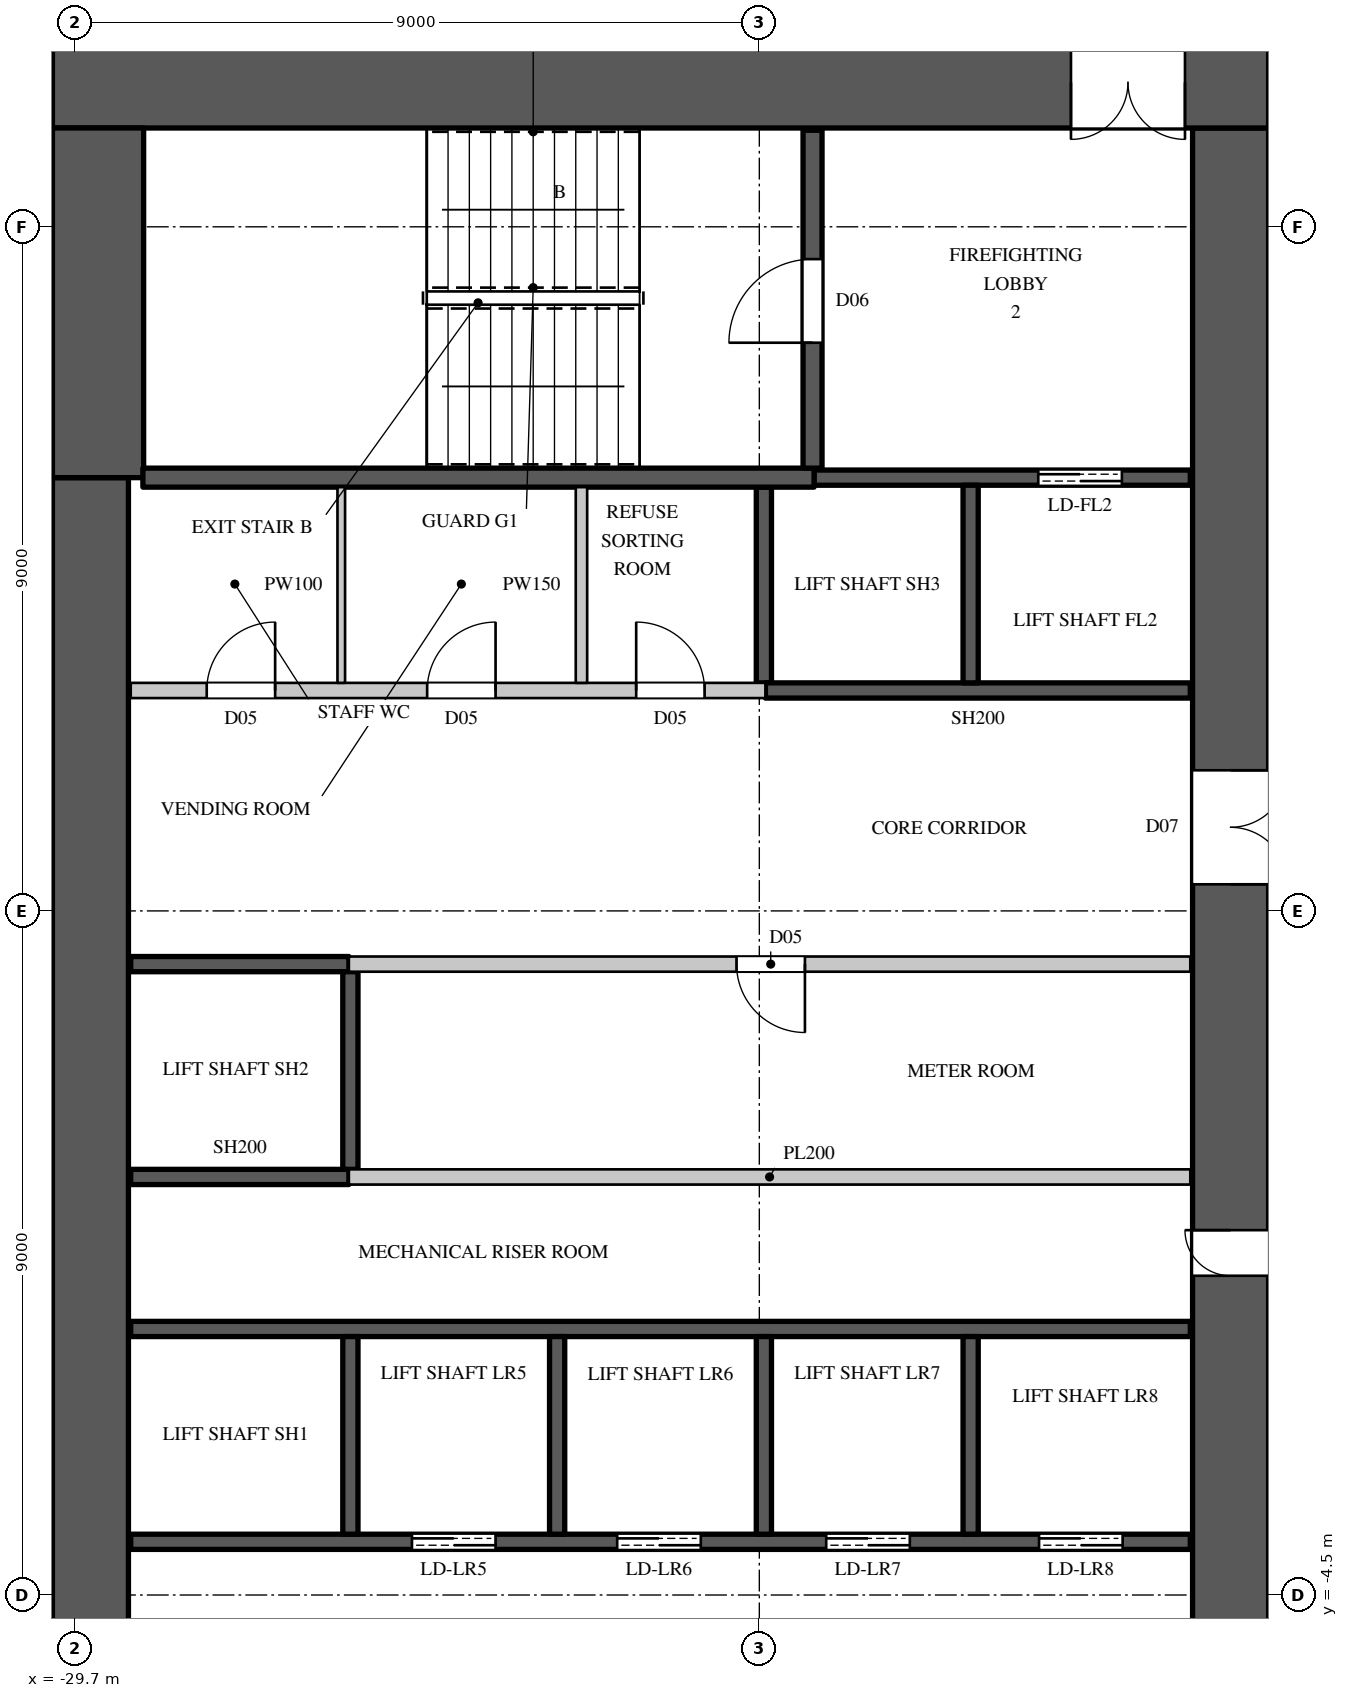
"""IFC4 building model, lengths in metres.
Left out: names, types, materials, properties, quantities, classifications, styles, units other than length and angle.
Written with IfcOpenShell. Run it as: python <this file> out.ifc"""

import sys

from ifc_helpers import new_model, si_unit, direction, frame, frame_2d, origin, place, context, subcontext, project, spatial, rectangle, extrude, element, fill, save


model = new_model("IFC4")
c1 = context("Model", 3, precision=1e-05, world=origin(), true_north=direction((0.0, 1.0)))
c2 = subcontext(c1, "Body", "Model", "MODEL_VIEW")
j1 = project(units=[si_unit("LENGTHUNIT", "METRE"), si_unit("PLANEANGLEUNIT", "RADIAN")], contexts=[c1])
p1 = place(None, origin())
s1 = spatial("IfcSite", under=j1, at=p1, CompositionType="ELEMENT")
p2 = place(p1, origin())
s2 = spatial("IfcBuilding", under=s1, at=p2, CompositionType="ELEMENT")
p3 = place(p2, frame((0.0, 0.0, 66.3)))
s3 = spatial("IfcBuildingStorey", under=s2, at=p3, CompositionType="ELEMENT", Elevation=66.3)
p4 = place(p3, frame((-30.0, 15.4, 0.0), z_axis=(0.0, 0.0, 1.0), x_axis=(1.0, 0.0, 0.0)))
e1 = element("IfcWall", 1, at=p4, inside=s3, PredefinedType="SHEAR", context=c2, shape_type="SweptSolid", body=[
    extrude(rectangle(XDim=16.0, YDim=1.2, at=frame_2d((8.0, 0.0))), origin(), (0.0, 0.0, 1.0), 3.6),
])
p5 = place(p4, frame((13.4, 0.0, 0.0)))
e2 = element("IfcOpeningElement", 2, at=p5, cuts=e1, PredefinedType="OPENING", context=c2, shape_type="SweptSolid", body=[
    extrude(rectangle(XDim=1.5, YDim=2.4, at=frame_2d((0.75, 1.2))), frame((0.0, 0.61, 0.0), z_axis=(0.0, -1.0, 0.0), x_axis=(1.0, 0.0, 0.0)), (0.0, 0.0, 1.0), 1.22),
])
p6 = place(p3, frame((-14.5, -14.8, 0.0), z_axis=(0.0, 0.0, 1.0), x_axis=(0.0, 1.0, 0.0)))
e3 = element("IfcWall", 3, at=p6, inside=s3, PredefinedType="SHEAR", context=c2, shape_type="SweptSolid", body=[
    extrude(rectangle(XDim=29.6, YDim=1.0, at=frame_2d((14.8, 0.0))), origin(), (0.0, 0.0, 1.0), 3.6),
])
p7 = place(p6, frame((8.45, 0.0, 0.0)))
e4 = element("IfcOpeningElement", 4, at=p7, cuts=e3, PredefinedType="OPENING", context=c2, shape_type="SweptSolid", body=[
    extrude(rectangle(XDim=1.5, YDim=2.4, at=frame_2d((0.75, 1.2))), frame((0.0, 0.51, 0.0), z_axis=(0.0, -1.0, 0.0), x_axis=(1.0, 0.0, 0.0)), (0.0, 0.0, 1.0), 1.02),
])
p8 = place(p6, frame((19.65, 0.0, 0.0)))
e5 = element("IfcOpeningElement", 5, at=p8, cuts=e3, PredefinedType="OPENING", context=c2, shape_type="SweptSolid", body=[
    extrude(rectangle(XDim=1.5, YDim=2.4, at=frame_2d((0.75, 1.2))), frame((0.0, 0.51, 0.0), z_axis=(0.0, -1.0, 0.0), x_axis=(1.0, 0.0, 0.0)), (0.0, 0.0, 1.0), 1.02),
])
p9 = place(p6, frame((14.5, 0.0, 0.0)))
e6 = element("IfcOpeningElement", 6, at=p9, cuts=e3, PredefinedType="OPENING", context=c2, shape_type="SweptSolid", body=[
    extrude(rectangle(XDim=0.6, YDim=2.0, at=frame_2d((0.3, 1.0))), frame((0.0, 0.51, 0.0), z_axis=(0.0, -1.0, 0.0), x_axis=(1.0, 0.0, 0.0)), (0.0, 0.0, 1.0), 1.02),
])
p10 = place(p3, frame((-29.5, -10.2, 0.0), z_axis=(0.0, 0.0, 1.0), x_axis=(0.0, 1.0, 0.0)))
e7 = element("IfcWall", 7, at=p10, inside=s3, PredefinedType="SHEAR", context=c2, shape_type="SweptSolid", body=[
    extrude(rectangle(XDim=20.4, YDim=1.0, at=frame_2d((10.2, 0.0))), origin(), (0.0, 0.0, 1.0), 3.6),
])
p11 = place(p3, frame((-29.4, 10.2, 0.0), z_axis=(0.0, 0.0, 1.0), x_axis=(0.0, 1.0, 0.0)))
e8 = element("IfcWall", 8, at=p11, inside=s3, PredefinedType="SHEAR", context=c2, shape_type="SweptSolid", body=[
    extrude(rectangle(XDim=4.6, YDim=1.2, at=frame_2d((2.3, 0.0))), origin(), (0.0, 0.0, 1.0), 3.6),
])
p12 = place(p3, frame((-28.97, 7.4, 0.0), z_axis=(0.0, 0.0, 1.0), x_axis=(1.0, 0.0, 0.0)))
e9 = element("IfcWall", 9, at=p12, inside=s3, PredefinedType="PARTITIONING", context=c2, shape_type="SweptSolid", body=[
    extrude(rectangle(XDim=8.35, YDim=0.2, at=frame_2d((4.175, 0.0))), origin(), (0.0, 0.0, 1.0), 3.3),
])
p13 = place(p12, frame((1.0, 0.0, 0.0)))
e10 = element("IfcOpeningElement", 10, at=p13, cuts=e9, PredefinedType="OPENING", context=c2, shape_type="SweptSolid", body=[
    extrude(rectangle(XDim=0.9, YDim=2.2, at=frame_2d((0.45, 1.1))), frame((0.0, 0.11, 0.0), z_axis=(0.0, -1.0, 0.0), x_axis=(1.0, 0.0, 0.0)), (0.0, 0.0, 1.0), 0.22),
])
p14 = place(p12, frame((3.9, 0.0, 0.0)))
e11 = element("IfcOpeningElement", 11, at=p14, cuts=e9, PredefinedType="OPENING", context=c2, shape_type="SweptSolid", body=[
    extrude(rectangle(XDim=0.9, YDim=2.2, at=frame_2d((0.45, 1.1))), frame((0.0, 0.11, 0.0), z_axis=(0.0, -1.0, 0.0), x_axis=(1.0, 0.0, 0.0)), (0.0, 0.0, 1.0), 0.22),
])
p15 = place(p12, frame((6.65, 0.0, 0.0)))
e12 = element("IfcOpeningElement", 12, at=p15, cuts=e9, PredefinedType="OPENING", context=c2, shape_type="SweptSolid", body=[
    extrude(rectangle(XDim=0.9, YDim=2.2, at=frame_2d((0.45, 1.1))), frame((0.0, 0.11, 0.0), z_axis=(0.0, -1.0, 0.0), x_axis=(1.0, 0.0, 0.0)), (0.0, 0.0, 1.0), 0.22),
])
p16 = place(p3, frame((-23.04, 7.5, 0.0), z_axis=(0.0, 0.0, 1.0), x_axis=(0.0, 1.0, 0.0)))
e13 = element("IfcWall", 13, at=p16, inside=s3, PredefinedType="PARTITIONING", context=c2, shape_type="SweptSolid", body=[
    extrude(rectangle(XDim=2.575, YDim=0.15, at=frame_2d((1.288, 0.0))), origin(), (0.0, 0.0, 1.0), 3.3),
])
p17 = place(p3, frame((-26.1, 1.0, 0.0), z_axis=(0.0, 0.0, 1.0), x_axis=(1.0, 0.0, 0.0)))
e14 = element("IfcWall", 14, at=p17, inside=s3, PredefinedType="PARTITIONING", context=c2, shape_type="SweptSolid", body=[
    extrude(rectangle(XDim=11.07, YDim=0.2, at=frame_2d((5.535, 0.0))), origin(), (0.0, 0.0, 1.0), 3.3),
])
p18 = place(p3, frame((-26.1, 3.8, 0.0), z_axis=(0.0, 0.0, 1.0), x_axis=(1.0, 0.0, 0.0)))
e15 = element("IfcWall", 15, at=p18, inside=s3, PredefinedType="PARTITIONING", context=c2, shape_type="SweptSolid", body=[
    extrude(rectangle(XDim=11.07, YDim=0.2, at=frame_2d((5.535, 0.0))), origin(), (0.0, 0.0, 1.0), 3.3),
])
p19 = place(p18, frame((5.1, 0.0, 0.0)))
e16 = element("IfcOpeningElement", 16, at=p19, cuts=e15, PredefinedType="OPENING", context=c2, shape_type="SweptSolid", body=[
    extrude(rectangle(XDim=0.9, YDim=2.2, at=frame_2d((0.45, 1.1))), frame((0.0, 0.11, 0.0), z_axis=(0.0, -1.0, 0.0), x_axis=(1.0, 0.0, 0.0)), (0.0, 0.0, 1.0), 0.22),
])
p20 = place(p3, frame((-28.97, -3.8, 0.0), z_axis=(0.0, 0.0, 1.0), x_axis=(1.0, 0.0, 0.0)))
e17 = element("IfcWall", 17, at=p20, inside=s3, PredefinedType="SHEAR", context=c2, shape_type="SweptSolid", body=[
    extrude(rectangle(XDim=13.94, YDim=0.2, at=frame_2d((6.97, 0.0))), origin(), (0.0, 0.0, 1.0), 3.3),
])
p21 = place(p20, frame((3.7, 0.0, 0.0)))
e18 = element("IfcOpeningElement", 18, at=p21, cuts=e17, PredefinedType="OPENING", context=c2, shape_type="SweptSolid", body=[
    extrude(rectangle(XDim=1.1, YDim=2.2, at=frame_2d((0.55, 1.1))), frame((0.0, 0.11, 0.0), z_axis=(0.0, -1.0, 0.0), x_axis=(1.0, 0.0, 0.0)), (0.0, 0.0, 1.0), 0.22),
])
p22 = place(p20, frame((6.4, 0.0, 0.0)))
e19 = element("IfcOpeningElement", 19, at=p22, cuts=e17, PredefinedType="OPENING", context=c2, shape_type="SweptSolid", body=[
    extrude(rectangle(XDim=1.1, YDim=2.2, at=frame_2d((0.55, 1.1))), frame((0.0, 0.11, 0.0), z_axis=(0.0, -1.0, 0.0), x_axis=(1.0, 0.0, 0.0)), (0.0, 0.0, 1.0), 0.22),
])
p23 = place(p20, frame((9.15, 0.0, 0.0)))
e20 = element("IfcOpeningElement", 20, at=p23, cuts=e17, PredefinedType="OPENING", context=c2, shape_type="SweptSolid", body=[
    extrude(rectangle(XDim=1.1, YDim=2.2, at=frame_2d((0.55, 1.1))), frame((0.0, 0.11, 0.0), z_axis=(0.0, -1.0, 0.0), x_axis=(1.0, 0.0, 0.0)), (0.0, 0.0, 1.0), 0.22),
])
p24 = place(p20, frame((11.95, 0.0, 0.0)))
e21 = element("IfcOpeningElement", 21, at=p24, cuts=e17, PredefinedType="OPENING", context=c2, shape_type="SweptSolid", body=[
    extrude(rectangle(XDim=1.1, YDim=2.2, at=frame_2d((0.55, 1.1))), frame((0.0, 0.11, 0.0), z_axis=(0.0, -1.0, 0.0), x_axis=(1.0, 0.0, 0.0)), (0.0, 0.0, 1.0), 0.22),
])
p25 = place(p3, frame((-28.97, -1.0, 0.0), z_axis=(0.0, 0.0, 1.0), x_axis=(1.0, 0.0, 0.0)))
e22 = element("IfcWall", 22, at=p25, inside=s3, PredefinedType="SHEAR", context=c2, shape_type="SweptSolid", body=[
    extrude(rectangle(XDim=13.94, YDim=0.2, at=frame_2d((6.97, 0.0))), origin(), (0.0, 0.0, 1.0), 3.3),
])
for number, where, z_axis, x_axis in (
    (23, (-28.97, 1.0, 0.0), (0.0, 0.0, 1.0), (1.0, 0.0, 0.0)),
    (24, (-28.97, 3.8, 0.0), (0.0, 0.0, 1.0), (1.0, 0.0, 0.0)),
):
    element("IfcWall", number, at=place(p3, frame(where, z_axis=z_axis, x_axis=x_axis)), inside=s3, PredefinedType="SHEAR", context=c2, shape_type="SweptSolid", body=[
        extrude(rectangle(XDim=2.87, YDim=0.2, at=frame_2d((1.435, 0.0))), origin(), (0.0, 0.0, 1.0), 3.3),
    ])
p26 = place(p3, frame((-26.08, -3.7, 0.0), z_axis=(0.0, 0.0, 1.0), x_axis=(0.0, 1.0, 0.0)))
e25 = element("IfcWall", 25, at=p26, inside=s3, PredefinedType="SHEAR", context=c2, shape_type="SweptSolid", body=[
    extrude(rectangle(XDim=2.6, YDim=0.2, at=frame_2d((1.3, 0.0))), origin(), (0.0, 0.0, 1.0), 3.6),
])
p27 = place(p3, frame((-26.08, 1.1, 0.0), z_axis=(0.0, 0.0, 1.0), x_axis=(0.0, 1.0, 0.0)))
e26 = element("IfcWall", 26, at=p27, inside=s3, PredefinedType="SHEAR", context=c2, shape_type="SweptSolid", body=[
    extrude(rectangle(XDim=2.6, YDim=0.2, at=frame_2d((1.3, 0.0))), origin(), (0.0, 0.0, 1.0), 3.3),
])
for number, where, z_axis, x_axis in (
    (27, (-23.36, -3.7, 0.0), (0.0, 0.0, 1.0), (0.0, 1.0, 0.0)),
    (28, (-20.64, -3.7, 0.0), (0.0, 0.0, 1.0), (0.0, 1.0, 0.0)),
):
    element("IfcWall", number, at=place(p3, frame(where, z_axis=z_axis, x_axis=x_axis)), inside=s3, PredefinedType="SHEAR", context=c2, shape_type="SweptSolid", body=[
        extrude(rectangle(XDim=2.6, YDim=0.2, at=frame_2d((1.3, 0.0))), origin(), (0.0, 0.0, 1.0), 3.6),
    ])
p28 = place(p3, frame((-20.64, 7.5, 0.0), z_axis=(0.0, 0.0, 1.0), x_axis=(0.0, 1.0, 0.0)))
e29 = element("IfcWall", 29, at=p28, inside=s3, PredefinedType="SHEAR", context=c2, shape_type="SweptSolid", body=[
    extrude(rectangle(XDim=2.575, YDim=0.2, at=frame_2d((1.288, 0.0))), origin(), (0.0, 0.0, 1.0), 3.3),
])
p29 = place(p3, frame((-20.62, 7.4, 0.0), z_axis=(0.0, 0.0, 1.0), x_axis=(1.0, 0.0, 0.0)))
e30 = element("IfcWall", 30, at=p29, inside=s3, PredefinedType="SHEAR", context=c2, shape_type="SweptSolid", body=[
    extrude(rectangle(XDim=5.59, YDim=0.2, at=frame_2d((2.795, 0.0))), origin(), (0.0, 0.0, 1.0), 3.3),
])
p30 = place(p3, frame((-19.98, 10.2, 0.0), z_axis=(0.0, 0.0, 1.0), x_axis=(1.0, 0.0, 0.0)))
e31 = element("IfcWall", 31, at=p30, inside=s3, PredefinedType="SHEAR", context=c2, shape_type="SweptSolid", body=[
    extrude(rectangle(XDim=4.95, YDim=0.2, at=frame_2d((2.475, 0.0))), origin(), (0.0, 0.0, 1.0), 3.3),
])
p31 = place(p30, frame((2.95, 0.0, 0.0)))
e32 = element("IfcOpeningElement", 32, at=p31, cuts=e31, PredefinedType="OPENING", context=c2, shape_type="SweptSolid", body=[
    extrude(rectangle(XDim=1.1, YDim=2.2, at=frame_2d((0.55, 1.1))), frame((0.0, 0.11, 0.0), z_axis=(0.0, -1.0, 0.0), x_axis=(1.0, 0.0, 0.0)), (0.0, 0.0, 1.0), 0.22),
])
p32 = place(p3, frame((-17.92, -3.7, 0.0), z_axis=(0.0, 0.0, 1.0), x_axis=(0.0, 1.0, 0.0)))
e33 = element("IfcWall", 33, at=p32, inside=s3, PredefinedType="SHEAR", context=c2, shape_type="SweptSolid", body=[
    extrude(rectangle(XDim=2.6, YDim=0.2, at=frame_2d((1.3, 0.0))), origin(), (0.0, 0.0, 1.0), 3.6),
])
p33 = place(p3, frame((-17.92, 7.5, 0.0), z_axis=(0.0, 0.0, 1.0), x_axis=(0.0, 1.0, 0.0)))
e34 = element("IfcWall", 34, at=p33, inside=s3, PredefinedType="SHEAR", context=c2, shape_type="SweptSolid", body=[
    extrude(rectangle(XDim=2.6, YDim=0.2, at=frame_2d((1.3, 0.0))), origin(), (0.0, 0.0, 1.0), 3.6),
])
p34 = place(p3, frame((-28.81, 10.2, 0.0), z_axis=(0.0, 0.0, 1.0), x_axis=(1.0, 0.0, 0.0)))
e35 = element("IfcWall", 35, at=p34, inside=s3, PredefinedType="SHEAR", context=c2, shape_type="SweptSolid", body=[
    extrude(rectangle(XDim=8.83, YDim=0.25, at=frame_2d((4.415, 0.0))), origin(), (0.0, 0.0, 1.0), 3.3),
])
p35 = place(p3, frame((-20.0, 10.325, 0.0), z_axis=(0.0, 0.0, 1.0), x_axis=(0.0, 1.0, 0.0)))
e36 = element("IfcWall", 36, at=p35, inside=s3, PredefinedType="SHEAR", context=c2, shape_type="SweptSolid", body=[
    extrude(rectangle(XDim=4.445, YDim=0.25, at=frame_2d((2.223, 0.0))), origin(), (0.0, 0.0, 1.0), 3.3),
])
p36 = place(p35, frame((1.65, 0.0, 0.0)))
e37 = element("IfcOpeningElement", 37, at=p36, cuts=e36, PredefinedType="OPENING", context=c2, shape_type="SweptSolid", body=[
    extrude(rectangle(XDim=1.1, YDim=2.2, at=frame_2d((0.55, 1.1))), frame((0.0, 0.135, 0.0), z_axis=(0.0, -1.0, 0.0), x_axis=(1.0, 0.0, 0.0)), (0.0, 0.0, 1.0), 0.27),
])
p37 = place(p3, frame((-26.2, 7.5, 0.0), z_axis=(0.0, 0.0, 1.0), x_axis=(0.0, 1.0, 0.0)))
e38 = element("IfcWall", 38, at=p37, inside=s3, PredefinedType="PARTITIONING", context=c2, shape_type="SweptSolid", body=[
    extrude(rectangle(XDim=2.575, YDim=0.1, at=frame_2d((1.288, 0.0))), origin(), (0.0, 0.0, 1.0), 3.3),
])
p38 = place(p36, origin())
e39 = element("IfcDoor", 39, at=p38, inside=s3, OperationType="SINGLE_SWING_LEFT", PredefinedType="DOOR", context=c2, shape_type="SweptSolid", body=[
    extrude(rectangle(XDim=1.1, YDim=2.2, at=frame_2d((0.55, 1.1))), frame((0.0, 0.025, 0.0), z_axis=(0.0, -1.0, 0.0), x_axis=(1.0, 0.0, 0.0)), (0.0, 0.0, 1.0), 0.05),
])
fill(e37, e39)
p39 = place(p19, origin())
e40 = element("IfcDoor", 40, at=p39, inside=s3, OperationType="SINGLE_SWING_LEFT", PredefinedType="DOOR", context=c2, shape_type="SweptSolid", body=[
    extrude(rectangle(XDim=0.9, YDim=2.2, at=frame_2d((0.45, 1.1))), frame((0.0, 0.025, 0.0), z_axis=(0.0, -1.0, 0.0), x_axis=(1.0, 0.0, 0.0)), (0.0, 0.0, 1.0), 0.05),
])
fill(e16, e40)
p40 = place(p13, origin())
e41 = element("IfcDoor", 41, at=p40, inside=s3, OperationType="SINGLE_SWING_RIGHT", PredefinedType="DOOR", context=c2, shape_type="SweptSolid", body=[
    extrude(rectangle(XDim=0.9, YDim=2.2, at=frame_2d((0.45, 1.1))), frame((0.0, 0.025, 0.0), z_axis=(0.0, -1.0, 0.0), x_axis=(1.0, 0.0, 0.0)), (0.0, 0.0, 1.0), 0.05),
])
fill(e10, e41)
p41 = place(p14, origin())
e42 = element("IfcDoor", 42, at=p41, inside=s3, OperationType="SINGLE_SWING_RIGHT", PredefinedType="DOOR", context=c2, shape_type="SweptSolid", body=[
    extrude(rectangle(XDim=0.9, YDim=2.2, at=frame_2d((0.45, 1.1))), frame((0.0, 0.025, 0.0), z_axis=(0.0, -1.0, 0.0), x_axis=(1.0, 0.0, 0.0)), (0.0, 0.0, 1.0), 0.05),
])
fill(e11, e42)
p42 = place(p15, origin())
e43 = element("IfcDoor", 43, at=p42, inside=s3, OperationType="SINGLE_SWING_LEFT", PredefinedType="DOOR", context=c2, shape_type="SweptSolid", body=[
    extrude(rectangle(XDim=0.9, YDim=2.2, at=frame_2d((0.45, 1.1))), frame((0.0, 0.025, 0.0), z_axis=(0.0, -1.0, 0.0), x_axis=(1.0, 0.0, 0.0)), (0.0, 0.0, 1.0), 0.05),
])
fill(e12, e43)
p43 = place(p21, origin())
e44 = element("IfcDoor", 44, at=p43, inside=s3, OperationType="DOUBLE_DOOR_SLIDING", PredefinedType="DOOR", context=c2, shape_type="SweptSolid", body=[
    extrude(rectangle(XDim=1.1, YDim=2.2, at=frame_2d((0.55, 1.1))), frame((0.0, 0.025, 0.0), z_axis=(0.0, -1.0, 0.0), x_axis=(1.0, 0.0, 0.0)), (0.0, 0.0, 1.0), 0.05),
])
fill(e18, e44)
p44 = place(p22, origin())
e45 = element("IfcDoor", 45, at=p44, inside=s3, OperationType="DOUBLE_DOOR_SLIDING", PredefinedType="DOOR", context=c2, shape_type="SweptSolid", body=[
    extrude(rectangle(XDim=1.1, YDim=2.2, at=frame_2d((0.55, 1.1))), frame((0.0, 0.025, 0.0), z_axis=(0.0, -1.0, 0.0), x_axis=(1.0, 0.0, 0.0)), (0.0, 0.0, 1.0), 0.05),
])
fill(e19, e45)
p45 = place(p23, origin())
e46 = element("IfcDoor", 46, at=p45, inside=s3, OperationType="DOUBLE_DOOR_SLIDING", PredefinedType="DOOR", context=c2, shape_type="SweptSolid", body=[
    extrude(rectangle(XDim=1.1, YDim=2.2, at=frame_2d((0.55, 1.1))), frame((0.0, 0.025, 0.0), z_axis=(0.0, -1.0, 0.0), x_axis=(1.0, 0.0, 0.0)), (0.0, 0.0, 1.0), 0.05),
])
fill(e20, e46)
p46 = place(p24, origin())
e47 = element("IfcDoor", 47, at=p46, inside=s3, OperationType="DOUBLE_DOOR_SLIDING", PredefinedType="DOOR", context=c2, shape_type="SweptSolid", body=[
    extrude(rectangle(XDim=1.1, YDim=2.2, at=frame_2d((0.55, 1.1))), frame((0.0, 0.025, 0.0), z_axis=(0.0, -1.0, 0.0), x_axis=(1.0, 0.0, 0.0)), (0.0, 0.0, 1.0), 0.05),
])
fill(e21, e47)
p47 = place(p31, origin())
e48 = element("IfcDoor", 48, at=p47, inside=s3, OperationType="DOUBLE_DOOR_SLIDING", PredefinedType="DOOR", context=c2, shape_type="SweptSolid", body=[
    extrude(rectangle(XDim=1.1, YDim=2.2, at=frame_2d((0.55, 1.1))), frame((0.0, 0.025, 0.0), z_axis=(0.0, -1.0, 0.0), x_axis=(1.0, 0.0, 0.0)), (0.0, 0.0, 1.0), 0.05),
])
fill(e32, e48)
p48 = place(p5, origin())
e49 = element("IfcDoor", 49, at=p48, inside=s3, OperationType="DOUBLE_DOOR_SINGLE_SWING", PredefinedType="DOOR", context=c2, shape_type="SweptSolid", body=[
    extrude(rectangle(XDim=1.5, YDim=2.4, at=frame_2d((0.75, 1.2))), frame((0.0, 0.025, 0.0), z_axis=(0.0, -1.0, 0.0), x_axis=(1.0, 0.0, 0.0)), (0.0, 0.0, 1.0), 0.05),
])
fill(e2, e49)
p49 = place(p8, origin())
e50 = element("IfcDoor", 50, at=p49, inside=s3, OperationType="DOUBLE_DOOR_SINGLE_SWING", PredefinedType="DOOR", context=c2, shape_type="SweptSolid", body=[
    extrude(rectangle(XDim=1.5, YDim=2.4, at=frame_2d((0.75, 1.2))), frame((0.0, -0.445, 0.0), z_axis=(0.0, -1.0, 0.0), x_axis=(1.0, 0.0, 0.0)), (0.0, 0.0, 1.0), 0.05),
])
fill(e5, e50)
p50 = place(p9, origin())
e51 = element("IfcDoor", 51, at=p50, inside=s3, OperationType="SINGLE_SWING_RIGHT", PredefinedType="DOOR", context=c2, shape_type="SweptSolid", body=[
    extrude(rectangle(XDim=0.6, YDim=2.0, at=frame_2d((0.3, 1.0))), frame((0.0, 0.495, 0.0), z_axis=(0.0, -1.0, 0.0), x_axis=(1.0, 0.0, 0.0)), (0.0, 0.0, 1.0), 0.05),
])
fill(e6, e51)
save(model, sys.argv[1])
